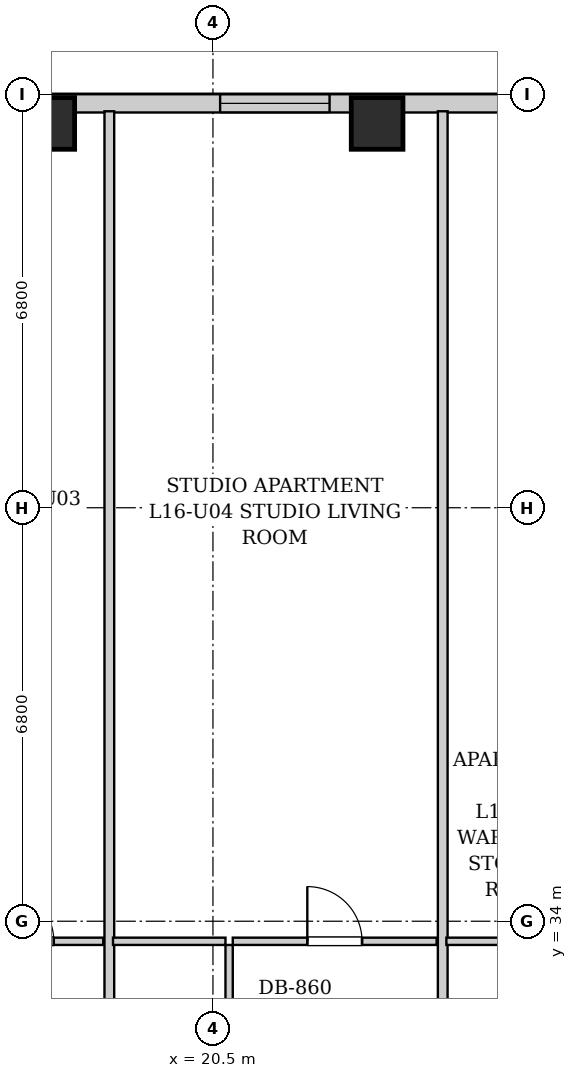
"""IFC4 building model, lengths in metres.
Left out: names, types, materials, properties, quantities, classifications, styles, units other than length and angle.
Written with IfcOpenShell. Run it as: python <this file> out.ifc"""

import sys

from ifc_helpers import new_model, si_unit, direction, frame, frame_2d, origin, origin_2d, place, context, subcontext, project, spatial, rectangle, extrude, element, fill, save


model = new_model("IFC4")
c1 = context("Model", 3, precision=1e-05, world=origin(), true_north=direction((0.0, 1.0)))
c2 = subcontext(c1, "Body", "Model", "MODEL_VIEW")
j1 = project(units=[si_unit("LENGTHUNIT", "METRE"), si_unit("PLANEANGLEUNIT", "RADIAN")], contexts=[c1])
p1 = place(None, origin())
s1 = spatial("IfcSite", under=j1, at=p1, CompositionType="ELEMENT")
p2 = place(p1, origin())
s2 = spatial("IfcBuilding", under=s1, at=p2, CompositionType="ELEMENT")
p3 = place(p2, frame((0.0, 0.0, 61.0)))
s3 = spatial("IfcBuildingStorey", under=s2, at=p3, CompositionType="ELEMENT", Elevation=61.0)
for number, where, z_axis, x_axis in (
    (1, (17.8, 47.12, 0.0), (0.0, 0.0, 1.0), (1.0, 0.0, 0.0)),
    (2, (23.2, 47.12, 0.0), (0.0, 0.0, 1.0), (1.0, 0.0, 0.0)),
):
    element("IfcColumn", number, at=place(p3, frame(where, z_axis=z_axis, x_axis=x_axis)), inside=s3, PredefinedType="COLUMN", context=c2, shape_type="SweptSolid", body=[
        extrude(rectangle(XDim=0.85, YDim=0.85, at=origin_2d()), origin(), (0.0, 0.0, 1.0), 3.2),
    ])
p4 = place(p3, frame((10.0, 47.45, 0.0), z_axis=(0.0, 0.0, 1.0), x_axis=(1.0, 0.0, 0.0)))
e3 = element("IfcWall", 3, at=p4, inside=s3, PredefinedType="SOLIDWALL", context=c2, shape_type="SweptSolid", body=[
    extrude(rectangle(XDim=26.35, YDim=0.3, at=frame_2d((13.175, 0.0))), origin(), (0.0, 0.0, 1.0), 1.975),
])
p5 = place(p4, frame((1.735, 0.0, 0.55)))
e4 = element("IfcOpeningElement", 4, at=p5, cuts=e3, PredefinedType="OPENING", context=c2, shape_type="SweptSolid", body=[
    extrude(rectangle(XDim=1.8, YDim=1.2, at=frame_2d((0.9, 0.6))), frame((0.0, 0.16, 0.0), z_axis=(0.0, -1.0, 0.0), x_axis=(1.0, 0.0, 0.0)), (0.0, 0.0, 1.0), 0.32),
])
p6 = place(p4, frame((5.415, 0.0, 0.55)))
e5 = element("IfcOpeningElement", 5, at=p6, cuts=e3, PredefinedType="OPENING", context=c2, shape_type="SweptSolid", body=[
    extrude(rectangle(XDim=1.8, YDim=1.2, at=frame_2d((0.9, 0.6))), frame((0.0, 0.16, 0.0), z_axis=(0.0, -1.0, 0.0), x_axis=(1.0, 0.0, 0.0)), (0.0, 0.0, 1.0), 0.32),
])
p7 = place(p4, frame((10.618, 0.0, 0.55)))
e6 = element("IfcOpeningElement", 6, at=p7, cuts=e3, PredefinedType="OPENING", context=c2, shape_type="SweptSolid", body=[
    extrude(rectangle(XDim=1.8, YDim=1.2, at=frame_2d((0.9, 0.6))), frame((0.0, 0.16, 0.0), z_axis=(0.0, -1.0, 0.0), x_axis=(1.0, 0.0, 0.0)), (0.0, 0.0, 1.0), 0.32),
])
p8 = place(p4, frame((17.696, 0.0, 0.55)))
e7 = element("IfcOpeningElement", 7, at=p8, cuts=e3, PredefinedType="OPENING", context=c2, shape_type="SweptSolid", body=[
    extrude(rectangle(XDim=1.8, YDim=1.2, at=frame_2d((0.9, 0.6))), frame((0.0, 0.16, 0.0), z_axis=(0.0, -1.0, 0.0), x_axis=(1.0, 0.0, 0.0)), (0.0, 0.0, 1.0), 0.32),
])
p9 = place(p4, frame((20.815, 0.0, 0.55)))
e8 = element("IfcOpeningElement", 8, at=p9, cuts=e3, PredefinedType="OPENING", context=c2, shape_type="SweptSolid", body=[
    extrude(rectangle(XDim=1.8, YDim=1.2, at=frame_2d((0.9, 0.6))), frame((0.0, 0.16, 0.0), z_axis=(0.0, -1.0, 0.0), x_axis=(1.0, 0.0, 0.0)), (0.0, 0.0, 1.0), 0.32),
])
p10 = place(p4, frame((23.785, 0.0, 0.55)))
e9 = element("IfcOpeningElement", 9, at=p10, cuts=e3, PredefinedType="OPENING", context=c2, shape_type="SweptSolid", body=[
    extrude(rectangle(XDim=1.35, YDim=1.2, at=frame_2d((0.675, 0.6))), frame((0.0, 0.16, 0.0), z_axis=(0.0, -1.0, 0.0), x_axis=(1.0, 0.0, 0.0)), (0.0, 0.0, 1.0), 0.32),
])
p11 = place(p3, frame((16.17, 33.67, 0.0), z_axis=(0.0, 0.0, 1.0), x_axis=(1.0, 0.0, 0.0)))
e10 = element("IfcWall", 10, at=p11, inside=s3, PredefinedType="PARTITIONING", context=c2, shape_type="SweptSolid", body=[
    extrude(rectangle(XDim=2.526, YDim=0.12, at=frame_2d((1.263, 0.0))), origin(), (0.0, 0.0, 1.0), 2.94),
])
p12 = place(p11, frame((0.813, 0.0, 0.0)))
e11 = element("IfcOpeningElement", 11, at=p12, cuts=e10, PredefinedType="OPENING", context=c2, shape_type="SweptSolid", body=[
    extrude(rectangle(XDim=0.9, YDim=2.05, at=frame_2d((0.45, 1.025))), frame((0.0, 0.07, 0.0), z_axis=(0.0, -1.0, 0.0), x_axis=(1.0, 0.0, 0.0)), (0.0, 0.0, 1.0), 0.14),
])
p13 = place(p3, frame((18.796, 30.76, 0.0), z_axis=(0.0, 0.0, 1.0), x_axis=(0.0, 1.0, 0.0)))
e12 = element("IfcWall", 12, at=p13, inside=s3, PredefinedType="PARTITIONING", context=c2, shape_type="SweptSolid", body=[
    extrude(rectangle(XDim=16.56, YDim=0.16, at=frame_2d((8.28, 0.0))), origin(), (0.0, 0.0, 1.0), 2.94),
])
p14 = place(p3, frame((20.766, 30.76, 0.0), z_axis=(0.0, 0.0, 1.0), x_axis=(0.0, 1.0, 0.0)))
e13 = element("IfcWall", 13, at=p14, inside=s3, PredefinedType="PARTITIONING", context=c2, shape_type="SweptSolid", body=[
    extrude(rectangle(XDim=2.85, YDim=0.12, at=frame_2d((1.425, 0.0))), origin(), (0.0, 0.0, 1.0), 2.94),
])
p15 = place(p14, frame((0.995, 0.0, 0.0)))
e14 = element("IfcOpeningElement", 14, at=p15, cuts=e13, PredefinedType="OPENING", context=c2, shape_type="SweptSolid", body=[
    extrude(rectangle(XDim=0.86, YDim=2.05, at=frame_2d((0.43, 1.025))), frame((0.0, 0.07, 0.0), z_axis=(0.0, -1.0, 0.0), x_axis=(1.0, 0.0, 0.0)), (0.0, 0.0, 1.0), 0.14),
])
p16 = place(p3, frame((18.856, 33.67, 0.0), z_axis=(0.0, 0.0, 1.0), x_axis=(1.0, 0.0, 0.0)))
e15 = element("IfcWall", 15, at=p16, inside=s3, PredefinedType="PARTITIONING", context=c2, shape_type="SweptSolid", body=[
    extrude(rectangle(XDim=1.85, YDim=0.12, at=frame_2d((0.925, 0.0))), origin(), (0.0, 0.0, 1.0), 2.94),
])
p17 = place(p3, frame((20.826, 33.67, 0.0), z_axis=(0.0, 0.0, 1.0), x_axis=(1.0, 0.0, 0.0)))
e16 = element("IfcWall", 16, at=p17, inside=s3, PredefinedType="PARTITIONING", context=c2, shape_type="SweptSolid", body=[
    extrude(rectangle(XDim=3.353, YDim=0.12, at=frame_2d((1.677, 0.0))), origin(), (0.0, 0.0, 1.0), 2.94),
])
p18 = place(p17, frame((1.226, 0.0, 0.0)))
e17 = element("IfcOpeningElement", 17, at=p18, cuts=e16, PredefinedType="OPENING", context=c2, shape_type="SweptSolid", body=[
    extrude(rectangle(XDim=0.9, YDim=2.05, at=frame_2d((0.45, 1.025))), frame((0.0, 0.07, 0.0), z_axis=(0.0, -1.0, 0.0), x_axis=(1.0, 0.0, 0.0)), (0.0, 0.0, 1.0), 0.14),
])
p19 = place(p3, frame((24.279, 30.76, 0.0), z_axis=(0.0, 0.0, 1.0), x_axis=(0.0, 1.0, 0.0)))
e18 = element("IfcWall", 18, at=p19, inside=s3, PredefinedType="PARTITIONING", context=c2, shape_type="SweptSolid", body=[
    extrude(rectangle(XDim=16.56, YDim=0.16, at=frame_2d((8.28, 0.0))), origin(), (0.0, 0.0, 1.0), 2.94),
])
p20 = place(p3, frame((24.339, 33.67, 0.0), z_axis=(0.0, 0.0, 1.0), x_axis=(1.0, 0.0, 0.0)))
e19 = element("IfcWall", 19, at=p20, inside=s3, PredefinedType="PARTITIONING", context=c2, shape_type="SweptSolid", body=[
    extrude(rectangle(XDim=2.3, YDim=0.12, at=frame_2d((1.15, 0.0))), origin(), (0.0, 0.0, 1.0), 2.94),
])
p21 = place(p12, origin())
e20 = element("IfcDoor", 20, at=p21, inside=s3, OperationType="SINGLE_SWING_LEFT", PredefinedType="DOOR", context=c2, shape_type="SweptSolid", body=[
    extrude(rectangle(XDim=0.9, YDim=2.05, at=frame_2d((0.45, 1.025))), frame((0.0, 0.025, 0.0), z_axis=(0.0, -1.0, 0.0), x_axis=(1.0, 0.0, 0.0)), (0.0, 0.0, 1.0), 0.05),
])
fill(e11, e20)
p22 = place(p18, origin())
e21 = element("IfcDoor", 21, at=p22, inside=s3, OperationType="SINGLE_SWING_LEFT", PredefinedType="DOOR", context=c2, shape_type="SweptSolid", body=[
    extrude(rectangle(XDim=0.9, YDim=2.05, at=frame_2d((0.45, 1.025))), frame((0.0, 0.025, 0.0), z_axis=(0.0, -1.0, 0.0), x_axis=(1.0, 0.0, 0.0)), (0.0, 0.0, 1.0), 0.05),
])
fill(e17, e21)
p23 = place(p7, origin())
e22 = element("IfcWindow", 22, at=p23, inside=s3, PartitioningType="DOUBLE_PANEL_VERTICAL", PredefinedType="WINDOW", context=c2, shape_type="SweptSolid", body=[
    extrude(rectangle(XDim=1.8, YDim=1.2, at=frame_2d((0.9, 0.6))), frame((0.0, 0.03, 0.0), z_axis=(0.0, -1.0, 0.0), x_axis=(1.0, 0.0, 0.0)), (0.0, 0.0, 1.0), 0.06),
])
fill(e6, e22)
save(model, sys.argv[1])
